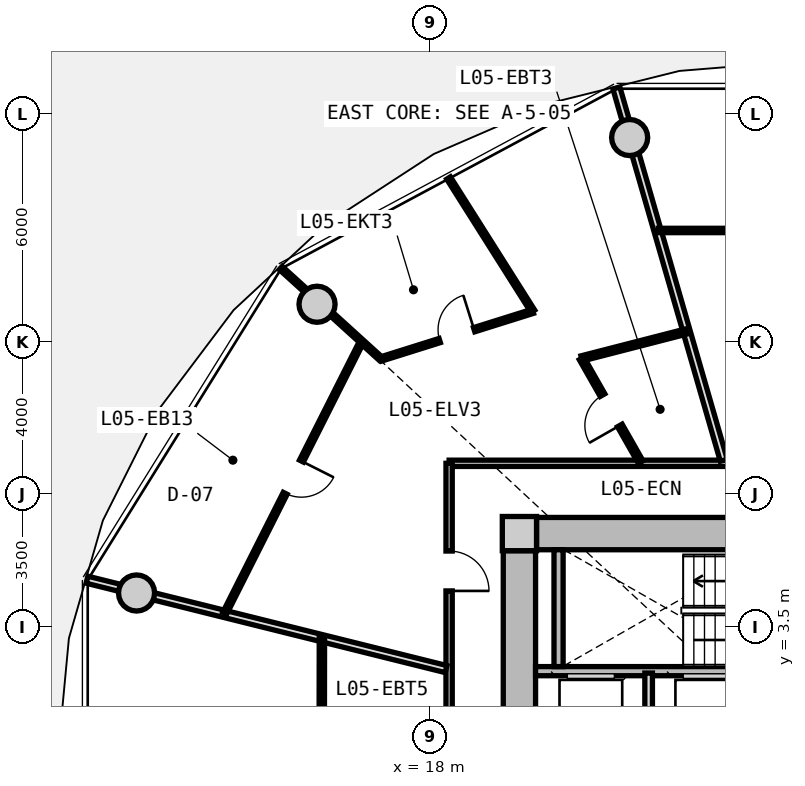
"""IFC4 building model, lengths in metres.
Left out: names, types, materials, properties, quantities, classifications, styles, units other than length and angle.
Written with IfcOpenShell. Run it as: python <this file> out.ifc"""

import sys

from ifc_helpers import new_model, si_unit, direction, frame, frame_2d, origin, origin_2d, place, context, subcontext, project, spatial, rectangle, circle, extrude, source, transform, mapped, element, fill, save


model = new_model("IFC4")
c1 = context("Model", 3, precision=1e-05, world=origin(), true_north=direction((0.0, 1.0)))
c2 = subcontext(c1, "Body", "Model", "MODEL_VIEW")
j1 = project(units=[si_unit("LENGTHUNIT", "METRE"), si_unit("PLANEANGLEUNIT", "RADIAN")], contexts=[c1])
p1 = place(None, origin())
s1 = spatial("IfcSite", under=j1, at=p1, CompositionType="ELEMENT")
p2 = place(p1, origin())
s2 = spatial("IfcBuilding", under=s1, at=p2, CompositionType="ELEMENT")
p3 = place(p2, frame((0.0, 0.0, 21.6)))
s3 = spatial("IfcBuildingStorey", under=s2, at=p3, CompositionType="ELEMENT", Elevation=21.6)
m1 = source(origin(), c2, "Body", "SweptSolid", [
    extrude(rectangle(XDim=0.9, YDim=0.9, at=origin_2d()), origin(), (0.0, 0.0, 1.0), 3.05),
])
p4 = place(p3, frame((20.35, 5.95, 0.0), z_axis=(0.0, 0.0, 1.0), x_axis=(1.0, 0.0, 0.0)))
e1 = element("IfcColumn", 1, at=p4, inside=s3, PredefinedType="COLUMN", context=c2, shape_type="MappedRepresentation", body=[
    mapped(m1, transform((0.0, 0.0, 0.0), x_axis=(1.0, 0.0, 0.0), y_axis=(0.0, 1.0, 0.0), z_axis=(0.0, 0.0, 1.0), scale=1.0)),
])
m2 = source(origin(), c2, "Body", "SweptSolid", [
    extrude(rectangle(XDim=14.4, YDim=0.85, at=frame_2d((7.2, 0.0))), origin(), (0.0, 0.0, 1.0), 2.79),
])
p5 = place(p3, frame((20.8, 5.95, 0.0), z_axis=(0.0, 0.0, 1.0), x_axis=(1.0, 0.0, 0.0)))
e2 = element("IfcWall", 2, at=p5, inside=s3, PredefinedType="SHEAR", context=c2, shape_type="MappedRepresentation", body=[
    mapped(m2, transform((0.0, 0.0, 0.0), x_axis=(1.0, 0.0, 0.0), y_axis=(0.0, 1.0, 0.0), z_axis=(0.0, 0.0, 1.0), scale=1.0)),
])
m3 = source(origin(), c2, "Body", "SweptSolid", [
    extrude(rectangle(XDim=11.0, YDim=0.85, at=frame_2d((5.5, 0.0))), origin(), (0.0, 0.0, 1.0), 2.79),
])
p6 = place(p3, frame((20.35, -5.5, 0.0), z_axis=(0.0, 0.0, 1.0), x_axis=(0.0, 1.0, 0.0)))
e3 = element("IfcWall", 3, at=p6, inside=s3, PredefinedType="SHEAR", context=c2, shape_type="MappedRepresentation", body=[
    mapped(m3, transform((0.0, 0.0, 0.0), x_axis=(1.0, 0.0, 0.0), y_axis=(0.0, 1.0, 0.0), z_axis=(0.0, 0.0, 1.0), scale=1.0)),
])
p7 = place(p6, frame((3.8, 0.0, 0.0)))
e4 = element("IfcOpeningElement", 4, at=p7, cuts=e3, PredefinedType="OPENING", context=c2, shape_type="SweptSolid", body=[
    extrude(rectangle(XDim=1.2, YDim=2.15, at=frame_2d((0.6, 1.075))), frame((0.0, 0.435, 0.0), z_axis=(0.0, -1.0, 0.0), x_axis=(1.0, 0.0, 0.0)), (0.0, 0.0, 1.0), 0.87),
])
m4 = source(origin(), c2, "Body", "SweptSolid", [
    extrude(circle(Radius=0.475, at=origin_2d()), origin(), (0.0, 0.0, 1.0), 3.47),
])
for number, where, z_axis, x_axis in (
    (5, (23.251, 16.373, -0.42), (0.0, 0.0, 1.0), (1.0, 0.0, 0.0)),
    (6, (15.025, 11.985, -0.42), (0.0, 0.0, 1.0), (1.0, 0.0, 0.0)),
    (7, (10.275, 4.387, -0.42), (0.0, 0.0, 1.0), (1.0, 0.0, 0.0)),
):
    element("IfcColumn", number, at=place(p3, frame(where, z_axis=z_axis, x_axis=x_axis)), inside=s3, PredefinedType="COLUMN", context=c2, shape_type="MappedRepresentation", body=[
        mapped(m4, transform((0.0, 0.0, 0.0), x_axis=(1.0, 0.0, 0.0), y_axis=(0.0, 1.0, 0.0), z_axis=(0.0, 0.0, 1.0), scale=1.0)),
    ])
m5 = source(origin(), c2, "Body", "SweptSolid", [
    extrude(rectangle(XDim=7.765, YDim=0.24, at=frame_2d((3.883, 0.0))), origin(), (0.0, 0.0, 1.0), 2.79),
])
p8 = place(p3, frame((20.775, 2.33, 0.0), z_axis=(0.0, 0.0, 1.0), x_axis=(1.0, 0.0, 0.0)))
e8 = element("IfcWall", 8, at=p8, inside=s3, PredefinedType="PARTITIONING", context=c2, shape_type="MappedRepresentation", body=[
    mapped(m5, transform((0.0, 0.0, 0.0), x_axis=(1.0, 0.0, 0.0), y_axis=(0.0, 1.0, 0.0), z_axis=(0.0, 0.0, 1.0), scale=1.0)),
])
m6 = source(origin(), c2, "Body", "SweptSolid", [
    extrude(rectangle(XDim=3.075, YDim=0.24, at=frame_2d((1.538, 0.0))), origin(), (0.0, 0.0, 1.0), 2.79),
])
p9 = place(p3, frame((21.38, 2.45, 0.0), z_axis=(0.0, 0.0, 1.0), x_axis=(0.0, 1.0, 0.0)))
e9 = element("IfcWall", 9, at=p9, inside=s3, PredefinedType="PARTITIONING", context=c2, shape_type="MappedRepresentation", body=[
    mapped(m6, transform((0.0, 0.0, 0.0), x_axis=(1.0, 0.0, 0.0), y_axis=(0.0, 1.0, 0.0), z_axis=(0.0, 0.0, 1.0), scale=1.0)),
])
m7 = source(origin(), c2, "Body", "SweptSolid", [
    extrude(rectangle(XDim=2.33, YDim=0.2, at=frame_2d((1.165, 0.0))), origin(), (0.0, 0.0, 1.0), 2.775),
])
p10 = place(p3, frame((23.75, -0.05, 0.0), z_axis=(0.0, 0.0, 1.0), x_axis=(0.0, 1.0, 0.0)))
e10 = element("IfcWall", 10, at=p10, inside=s3, PredefinedType="PARTITIONING", context=c2, shape_type="MappedRepresentation", body=[
    mapped(m7, transform((0.0, 0.0, 0.0), x_axis=(1.0, 0.0, 0.0), y_axis=(0.0, 1.0, 0.0), z_axis=(0.0, 0.0, 1.0), scale=1.0)),
])
m8 = source(origin(), c2, "Body", "SweptSolid", [
    extrude(rectangle(XDim=19.0, YDim=0.165, at=frame_2d((9.5, 0.0))), origin(), (0.0, 0.0, 1.0), 2.775),
])
p11 = place(p3, frame((18.5, 7.8, 0.0), z_axis=(0.0, 0.0, 1.0), x_axis=(1.0, 0.0, 0.0)))
e11 = element("IfcWall", 11, at=p11, inside=s3, PredefinedType="PARTITIONING", context=c2, shape_type="MappedRepresentation", body=[
    mapped(m8, transform((0.0, 0.0, 0.0), x_axis=(1.0, 0.0, 0.0), y_axis=(0.0, 1.0, 0.0), z_axis=(0.0, 0.0, 1.0), scale=1.0)),
])
p12 = place(p11, frame((10.448, 0.0, 0.0)))
e12 = element("IfcOpeningElement", 12, at=p12, cuts=e11, PredefinedType="OPENING", context=c2, shape_type="SweptSolid", body=[
    extrude(rectangle(XDim=1.05, YDim=2.15, at=frame_2d((0.525, 1.075))), frame((0.0, 0.093, 0.0), z_axis=(0.0, -1.0, 0.0), x_axis=(1.0, 0.0, 0.0)), (0.0, 0.0, 1.0), 0.185),
])
m9 = source(origin(), c2, "Body", "SweptSolid", [
    extrude(rectangle(XDim=15.6, YDim=0.165, at=frame_2d((7.8, 0.0))), origin(), (0.0, 0.0, 1.0), 2.775),
])
p13 = place(p3, frame((18.5, -7.8, 0.0), z_axis=(0.0, 0.0, 1.0), x_axis=(0.0, 1.0, 0.0)))
e13 = element("IfcWall", 13, at=p13, inside=s3, PredefinedType="PARTITIONING", context=c2, shape_type="MappedRepresentation", body=[
    mapped(m9, transform((0.0, 0.0, 0.0), x_axis=(1.0, 0.0, 0.0), y_axis=(0.0, 1.0, 0.0), z_axis=(0.0, 0.0, 1.0), scale=1.0)),
])
p14 = place(p13, frame((12.241, 0.0, 0.0)))
e14 = element("IfcOpeningElement", 14, at=p14, cuts=e13, PredefinedType="OPENING", context=c2, shape_type="SweptSolid", body=[
    extrude(rectangle(XDim=1.05, YDim=2.15, at=frame_2d((0.525, 1.075))), frame((0.0, 0.093, 0.0), z_axis=(0.0, -1.0, 0.0), x_axis=(1.0, 0.0, 0.0)), (0.0, 0.0, 1.0), 0.185),
])
p15 = place(p13, frame((3.63, 0.0, 0.0)))
e15 = element("IfcOpeningElement", 15, at=p15, cuts=e13, PredefinedType="OPENING", context=c2, shape_type="SweptSolid", body=[
    extrude(rectangle(XDim=1.05, YDim=2.15, at=frame_2d((0.525, 1.075))), frame((0.0, 0.093, 0.0), z_axis=(0.0, -1.0, 0.0), x_axis=(1.0, 0.0, 0.0)), (0.0, 0.0, 1.0), 0.185),
])
m10 = source(origin(), c2, "Body", "SweptSolid", [
    extrude(rectangle(XDim=10.196, YDim=0.19, at=frame_2d((5.098, 0.0))), origin(), (0.0, 0.0, 1.0), 2.225),
])
p16 = place(p3, frame((25.727, 7.88, 0.0), z_axis=(0.0, 0.0, 1.0), x_axis=(-0.277136420347, 0.960830580549, 0.0)))
e16 = element("IfcWall", 16, at=p16, inside=s3, PredefinedType="PARTITIONING", context=c2, shape_type="MappedRepresentation", body=[
    mapped(m10, transform((0.0, 0.0, 0.0), x_axis=(1.0, 0.0, 0.0), y_axis=(0.0, 1.0, 0.0), z_axis=(0.0, 0.0, 1.0), scale=1.0)),
])
m11 = source(origin(), c2, "Body", "SweptSolid", [
    extrude(rectangle(XDim=7.993, YDim=0.115, at=frame_2d((3.996, 0.0))), origin(), (0.0, 0.0, 1.0), 2.775),
])
p17 = place(p3, frame((31.996, 13.927, 0.0), z_axis=(0.0, 0.0, 1.0), x_axis=(-1.0, 0.0, 0.0)))
e17 = element("IfcWall", 17, at=p17, inside=s3, PredefinedType="PARTITIONING", context=c2, shape_type="MappedRepresentation", body=[
    mapped(m11, transform((0.0, 0.0, 0.0), x_axis=(1.0, 0.0, 0.0), y_axis=(0.0, 1.0, 0.0), z_axis=(0.0, 0.0, 1.0), scale=1.0)),
])
p18 = place(p17, frame((3.521, 0.0, 0.0)))
e18 = element("IfcOpeningElement", 18, at=p18, cuts=e17, PredefinedType="OPENING", context=c2, shape_type="SweptSolid", body=[
    extrude(rectangle(XDim=0.95, YDim=2.1, at=frame_2d((0.475, 1.05))), frame((0.0, 0.067, 0.0), z_axis=(0.0, -1.0, 0.0), x_axis=(1.0, 0.0, 0.0)), (0.0, 0.0, 1.0), 0.135),
])
m12 = source(origin(), c2, "Body", "SweptSolid", [
    extrude(rectangle(XDim=9.737, YDim=0.19, at=frame_2d((4.869, 0.0))), origin(), (0.0, 0.0, 1.0), 2.225),
])
p19 = place(p3, frame((18.42, 2.385, 0.0), z_axis=(0.0, 0.0, 1.0), x_axis=(-0.970392716238, 0.241532557375, 0.0)))
e19 = element("IfcWall", 19, at=p19, inside=s3, PredefinedType="PARTITIONING", context=c2, shape_type="MappedRepresentation", body=[
    mapped(m12, transform((0.0, 0.0, 0.0), x_axis=(1.0, 0.0, 0.0), y_axis=(0.0, 1.0, 0.0), z_axis=(0.0, 0.0, 1.0), scale=1.0)),
])
m13 = source(origin(), c2, "Body", "SweptSolid", [
    extrude(rectangle(XDim=8.018, YDim=0.115, at=frame_2d((4.009, 0.0))), origin(), (0.0, 0.0, 1.0), 2.775),
])
p20 = place(p3, frame((16.205, 11.014, 0.0), z_axis=(0.0, 0.0, 1.0), x_axis=(-0.450134355233, -0.89296084026, 0.0)))
e20 = element("IfcWall", 20, at=p20, inside=s3, PredefinedType="PARTITIONING", context=c2, shape_type="MappedRepresentation", body=[
    mapped(m13, transform((0.0, 0.0, 0.0), x_axis=(1.0, 0.0, 0.0), y_axis=(0.0, 1.0, 0.0), z_axis=(0.0, 0.0, 1.0), scale=1.0)),
])
p21 = place(p20, frame((3.534, 0.0, 0.0)))
e21 = element("IfcOpeningElement", 21, at=p21, cuts=e20, PredefinedType="OPENING", context=c2, shape_type="SweptSolid", body=[
    extrude(rectangle(XDim=0.95, YDim=2.1, at=frame_2d((0.475, 1.05))), frame((0.0, 0.067, 0.0), z_axis=(0.0, -1.0, 0.0), x_axis=(1.0, 0.0, 0.0)), (0.0, 0.0, 1.0), 0.135),
])
m14 = source(origin(), c2, "Body", "SweptSolid", [
    extrude(rectangle(XDim=3.551, YDim=0.115, at=frame_2d((1.775, 0.0))), origin(), (0.0, 0.0, 1.0), 2.225),
])
p22 = place(p3, frame((16.698, 10.553, 0.0), z_axis=(0.0, 0.0, 1.0), x_axis=(-0.740291560769, 0.672285954824, 0.0)))
e22 = element("IfcWall", 22, at=p22, inside=s3, PredefinedType="PARTITIONING", context=c2, shape_type="MappedRepresentation", body=[
    mapped(m14, transform((0.0, 0.0, 0.0), x_axis=(1.0, 0.0, 0.0), y_axis=(0.0, 1.0, 0.0), z_axis=(0.0, 0.0, 1.0), scale=1.0)),
])
m15 = source(origin(), c2, "Body", "SweptSolid", [
    extrude(rectangle(XDim=3.141, YDim=0.14, at=frame_2d((1.571, 0.0))), origin(), (0.0, 0.0, 1.0), 2.775),
])
p23 = place(p3, frame((23.542, 7.83, 0.0), z_axis=(0.0, 0.0, 1.0), x_axis=(-0.494874486088, 0.868964465913, 0.0)))
e23 = element("IfcWall", 23, at=p23, inside=s3, PredefinedType="PARTITIONING", context=c2, shape_type="MappedRepresentation", body=[
    mapped(m15, transform((0.0, 0.0, 0.0), x_axis=(1.0, 0.0, 0.0), y_axis=(0.0, 1.0, 0.0), z_axis=(0.0, 0.0, 1.0), scale=1.0)),
])
p24 = place(p23, frame((1.111, 0.0, 0.0)))
e24 = element("IfcOpeningElement", 24, at=p24, cuts=e23, PredefinedType="OPENING", context=c2, shape_type="SweptSolid", body=[
    extrude(rectangle(XDim=0.92, YDim=2.1, at=frame_2d((0.46, 1.05))), frame((0.0, 0.08, 0.0), z_axis=(0.0, -1.0, 0.0), x_axis=(1.0, 0.0, 0.0)), (0.0, 0.0, 1.0), 0.16),
])
m16 = source(origin(), c2, "Body", "SweptSolid", [
    extrude(rectangle(XDim=2.868, YDim=0.14, at=frame_2d((1.434, 0.0))), origin(), (0.0, 0.0, 1.0), 2.775),
])
p25 = place(p3, frame((21.987, 10.56, 0.0), z_axis=(0.0, 0.0, 1.0), x_axis=(0.968467705195, 0.249139125778, 0.0)))
e25 = element("IfcWall", 25, at=p25, inside=s3, PredefinedType="PARTITIONING", context=c2, shape_type="MappedRepresentation", body=[
    mapped(m16, transform((0.0, 0.0, 0.0), x_axis=(1.0, 0.0, 0.0), y_axis=(0.0, 1.0, 0.0), z_axis=(0.0, 0.0, 1.0), scale=1.0)),
])
m17 = source(origin(), c2, "Body", "SweptSolid", [
    extrude(rectangle(XDim=4.15, YDim=0.115, at=frame_2d((2.075, 0.0))), origin(), (0.0, 0.0, 1.0), 2.775),
])
p26 = place(p3, frame((20.704, 11.801, 0.0), z_axis=(0.0, 0.0, 1.0), x_axis=(-0.534475378192, 0.845184045109, 0.0)))
e26 = element("IfcWall", 26, at=p26, inside=s3, PredefinedType="PARTITIONING", context=c2, shape_type="MappedRepresentation", body=[
    mapped(m17, transform((0.0, 0.0, 0.0), x_axis=(1.0, 0.0, 0.0), y_axis=(0.0, 1.0, 0.0), z_axis=(0.0, 0.0, 1.0), scale=1.0)),
])
m18 = source(origin(), c2, "Body", "SweptSolid", [
    extrude(rectangle(XDim=4.189, YDim=0.115, at=frame_2d((2.094, 0.0))), origin(), (0.0, 0.0, 1.0), 2.775),
])
p27 = place(p3, frame((20.704, 11.801, 0.0), z_axis=(0.0, 0.0, 1.0), x_axis=(-0.954002766053, -0.299797802467, 0.0)))
e27 = element("IfcWall", 27, at=p27, inside=s3, PredefinedType="PARTITIONING", context=c2, shape_type="MappedRepresentation", body=[
    mapped(m18, transform((0.0, 0.0, 0.0), x_axis=(1.0, 0.0, 0.0), y_axis=(0.0, 1.0, 0.0), z_axis=(0.0, 0.0, 1.0), scale=1.0)),
])
p28 = place(p27, frame((1.619, 0.0, 0.0)))
e28 = element("IfcOpeningElement", 28, at=p28, cuts=e27, PredefinedType="OPENING", context=c2, shape_type="SweptSolid", body=[
    extrude(rectangle(XDim=0.95, YDim=2.1, at=frame_2d((0.475, 1.05))), frame((0.0, 0.067, 0.0), z_axis=(0.0, -1.0, 0.0), x_axis=(1.0, 0.0, 0.0)), (0.0, 0.0, 1.0), 0.135),
])
m19 = source(origin(), c2, "Body", "SweptSolid", [
    extrude(rectangle(XDim=2.795, YDim=0.14, at=frame_2d((1.397, 0.0))), origin(), (0.0, 0.0, 1.0), 2.775),
])
p29 = place(p3, frame((15.148, 0.419, 0.0), z_axis=(0.0, 0.0, 1.0), x_axis=(0.001659531299, 0.999998622977, 0.0)))
e29 = element("IfcWall", 29, at=p29, inside=s3, PredefinedType="PARTITIONING", context=c2, shape_type="MappedRepresentation", body=[
    mapped(m19, transform((0.0, 0.0, 0.0), x_axis=(1.0, 0.0, 0.0), y_axis=(0.0, 1.0, 0.0), z_axis=(0.0, 0.0, 1.0), scale=1.0)),
])
m20 = source(origin(), c2, "Body", "SweptSolid", [
    extrude(rectangle(XDim=1.05, YDim=2.15, at=frame_2d((0.525, 1.075))), frame((0.0, 0.025, 0.0), z_axis=(0.0, -1.0, 0.0), x_axis=(1.0, 0.0, 0.0)), (0.0, 0.0, 1.0), 0.05),
])
p30 = place(p14, frame((1.05, 0.0, 0.0), z_axis=(0.0, 0.0, 1.0), x_axis=(-1.0, 0.0, 0.0)))
e30 = element("IfcDoor", 30, at=p30, inside=s3, OperationType="SINGLE_SWING_RIGHT", PredefinedType="DOOR", context=c2, shape_type="MappedRepresentation", body=[
    mapped(m20, transform((0.0, 0.0, 0.0), x_axis=(1.0, 0.0, 0.0), y_axis=(0.0, 1.0, 0.0), z_axis=(0.0, 0.0, 1.0), scale=1.0)),
])
fill(e14, e30)
m21 = source(origin(), c2, "Body", "SweptSolid", [
    extrude(rectangle(XDim=0.92, YDim=2.1, at=frame_2d((0.46, 1.05))), frame((0.0, 0.025, 0.0), z_axis=(0.0, -1.0, 0.0), x_axis=(1.0, 0.0, 0.0)), (0.0, 0.0, 1.0), 0.05),
])
p31 = place(p24, origin())
e31 = element("IfcDoor", 31, at=p31, inside=s3, OperationType="SINGLE_SWING_LEFT", PredefinedType="DOOR", context=c2, shape_type="MappedRepresentation", body=[
    mapped(m21, transform((0.0, 0.0, 0.0), x_axis=(1.0, 0.0, 0.0), y_axis=(0.0, 1.0, 0.0), z_axis=(0.0, 0.0, 1.0), scale=1.0)),
])
fill(e24, e31)
m22 = source(origin(), c2, "Body", "SweptSolid", [
    extrude(rectangle(XDim=0.95, YDim=2.1, at=frame_2d((0.475, 1.05))), frame((0.0, 0.025, 0.0), z_axis=(0.0, -1.0, 0.0), x_axis=(1.0, 0.0, 0.0)), (0.0, 0.0, 1.0), 0.05),
])
p32 = place(p28, frame((0.95, 0.0, 0.0), z_axis=(0.0, 0.0, 1.0), x_axis=(-1.0, 0.0, 0.0)))
e32 = element("IfcDoor", 32, at=p32, inside=s3, OperationType="SINGLE_SWING_RIGHT", PredefinedType="DOOR", context=c2, shape_type="MappedRepresentation", body=[
    mapped(m22, transform((0.0, 0.0, 0.0), x_axis=(1.0, 0.0, 0.0), y_axis=(0.0, 1.0, 0.0), z_axis=(0.0, 0.0, 1.0), scale=1.0)),
])
fill(e28, e32)
p33 = place(p21, origin())
e33 = element("IfcDoor", 33, at=p33, inside=s3, OperationType="SINGLE_SWING_LEFT", PredefinedType="DOOR", context=c2, shape_type="MappedRepresentation", body=[
    mapped(m22, transform((0.0, 0.0, 0.0), x_axis=(1.0, 0.0, 0.0), y_axis=(0.0, 1.0, 0.0), z_axis=(0.0, 0.0, 1.0), scale=1.0)),
])
fill(e21, e33)
save(model, sys.argv[1])
